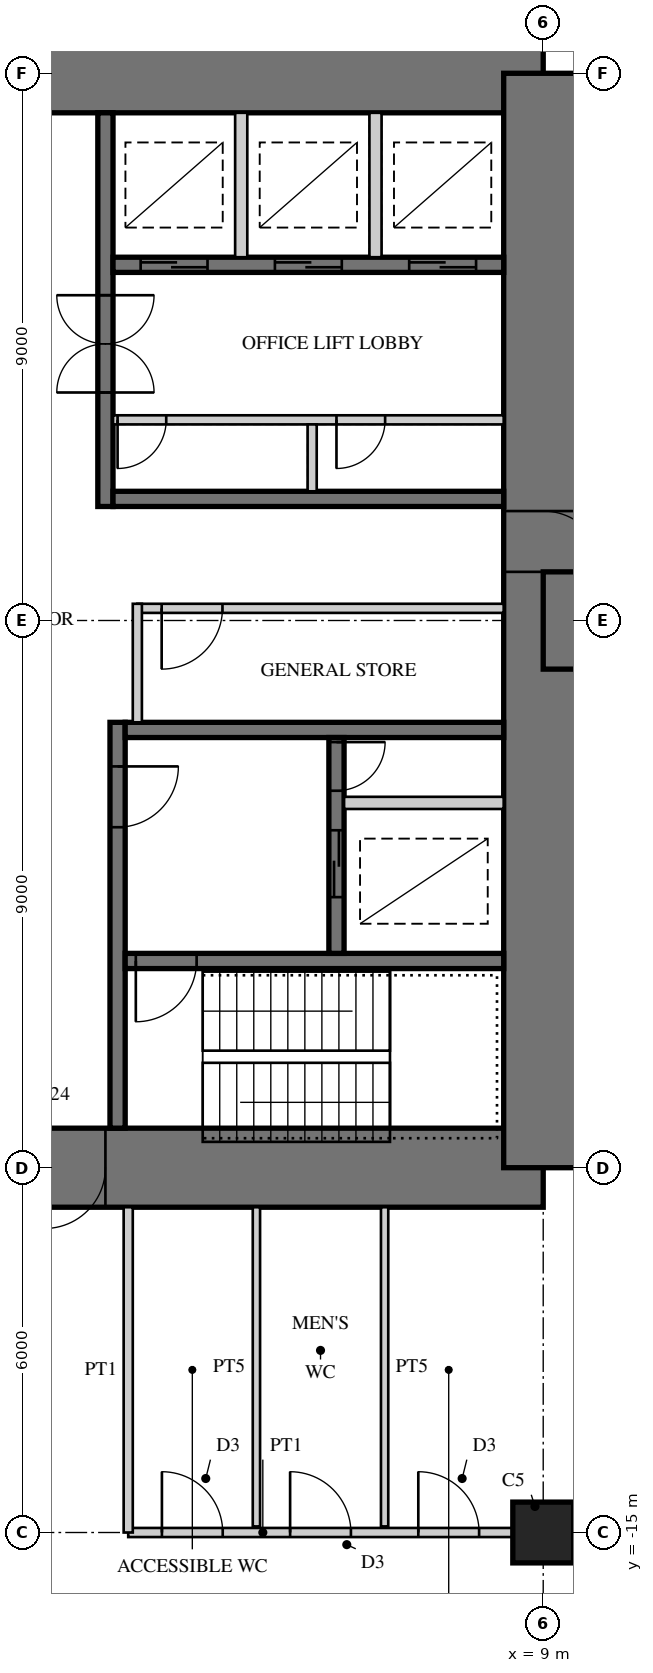
"""IFC4 building model, lengths in metres.
Left out: names, types, materials, properties, quantities, classifications, styles, units other than length and angle.
Written with IfcOpenShell. Run it as: python <this file> out.ifc"""

import sys

from ifc_helpers import new_model, si_unit, direction, frame, frame_2d, origin, origin_2d, place, context, subcontext, project, spatial, rectangle, extrude, element, fill, save


model = new_model("IFC4")
c1 = context("Model", 3, precision=1e-05, world=origin(), true_north=direction((0.0, 1.0)))
c2 = subcontext(c1, "Body", "Model", "MODEL_VIEW")
j1 = project(units=[si_unit("LENGTHUNIT", "METRE"), si_unit("PLANEANGLEUNIT", "RADIAN")], contexts=[c1])
p1 = place(None, origin())
s1 = spatial("IfcSite", under=j1, at=p1, CompositionType="ELEMENT")
p2 = place(p1, origin())
s2 = spatial("IfcBuilding", under=s1, at=p2, CompositionType="ELEMENT")
p3 = place(p2, frame((0.0, 0.0, 152.5)))
s3 = spatial("IfcBuildingStorey", under=s2, at=p3, CompositionType="ELEMENT", Elevation=152.5)
p4 = place(p3, frame((9.0, 9.0, 0.0), z_axis=(0.0, 0.0, 1.0), x_axis=(-1.0, 0.0, 0.0)))
e1 = element("IfcWall", 1, at=p4, inside=s3, PredefinedType="SHEAR", context=c2, shape_type="SweptSolid", body=[
    extrude(rectangle(XDim=18.0, YDim=1.3, at=frame_2d((9.0, 0.0))), origin(), (0.0, 0.0, 1.0), 4.0),
])
p5 = place(p4, frame((9.8, 0.0, 0.0)))
e2 = element("IfcOpeningElement", 2, at=p5, cuts=e1, PredefinedType="OPENING", context=c2, shape_type="SweptSolid", body=[
    extrude(rectangle(XDim=1.0, YDim=2.4, at=frame_2d((0.5, 1.2))), frame((0.0, 0.66, 0.0), z_axis=(0.0, -1.0, 0.0), x_axis=(1.0, 0.0, 0.0)), (0.0, 0.0, 1.0), 1.32),
])
p6 = place(p3, frame((-9.0, -9.0, 0.0), z_axis=(0.0, 0.0, 1.0), x_axis=(1.0, 0.0, 0.0)))
e3 = element("IfcWall", 3, at=p6, inside=s3, PredefinedType="SHEAR", context=c2, shape_type="SweptSolid", body=[
    extrude(rectangle(XDim=18.0, YDim=1.3, at=frame_2d((9.0, 0.0))), origin(), (0.0, 0.0, 1.0), 4.0),
])
p7 = place(p6, frame((9.8, 0.0, 0.0)))
e4 = element("IfcOpeningElement", 4, at=p7, cuts=e3, PredefinedType="OPENING", context=c2, shape_type="SweptSolid", body=[
    extrude(rectangle(XDim=1.0, YDim=2.4, at=frame_2d((0.5, 1.2))), frame((0.0, 0.66, 0.0), z_axis=(0.0, -1.0, 0.0), x_axis=(1.0, 0.0, 0.0)), (0.0, 0.0, 1.0), 1.32),
])
p8 = place(p3, frame((9.0, -9.0, 0.0), z_axis=(0.0, 0.0, 1.0), x_axis=(0.0, 1.0, 0.0)))
e5 = element("IfcWall", 5, at=p8, inside=s3, PredefinedType="SHEAR", context=c2, shape_type="SweptSolid", body=[
    extrude(rectangle(XDim=18.0, YDim=1.3, at=frame_2d((9.0, 0.0))), origin(), (0.0, 0.0, 1.0), 4.0),
])
p9 = place(p8, frame((9.8, 0.0, 0.0)))
e6 = element("IfcOpeningElement", 6, at=p9, cuts=e5, PredefinedType="OPENING", context=c2, shape_type="SweptSolid", body=[
    extrude(rectangle(XDim=1.0, YDim=2.4, at=frame_2d((0.5, 1.2))), frame((0.0, 0.66, 0.0), z_axis=(0.0, -1.0, 0.0), x_axis=(1.0, 0.0, 0.0)), (0.0, 0.0, 1.0), 1.32),
])
p10 = place(p3, frame((1.8, 1.875, 0.0), z_axis=(0.0, 0.0, 1.0), x_axis=(0.0, 1.0, 0.0)))
e7 = element("IfcWall", 7, at=p10, inside=s3, PredefinedType="SHEAR", context=c2, shape_type="SweptSolid", body=[
    extrude(rectangle(XDim=6.475, YDim=0.25, at=frame_2d((3.238, 0.0))), origin(), (0.0, 0.0, 1.0), 4.0),
])
p11 = place(p10, frame((1.875, 0.0, 0.0)))
e8 = element("IfcOpeningElement", 8, at=p11, cuts=e7, PredefinedType="OPENING", context=c2, shape_type="SweptSolid", body=[
    extrude(rectangle(XDim=1.6, YDim=2.4, at=frame_2d((0.8, 1.2))), frame((0.0, 0.135, 0.0), z_axis=(0.0, -1.0, 0.0), x_axis=(1.0, 0.0, 0.0)), (0.0, 0.0, 1.0), 0.27),
])
p12 = place(p3, frame((1.925, 2.0, 0.0), z_axis=(0.0, 0.0, 1.0), x_axis=(1.0, 0.0, 0.0)))
e9 = element("IfcWall", 9, at=p12, inside=s3, PredefinedType="SHEAR", context=c2, shape_type="SweptSolid", body=[
    extrude(rectangle(XDim=6.425, YDim=0.25, at=frame_2d((3.212, 0.0))), origin(), (0.0, 0.0, 1.0), 4.0),
])
p13 = place(p3, frame((1.925, 5.85, 0.0), z_axis=(0.0, 0.0, 1.0), x_axis=(1.0, 0.0, 0.0)))
e10 = element("IfcWall", 10, at=p13, inside=s3, PredefinedType="SHEAR", context=c2, shape_type="SweptSolid", body=[
    extrude(rectangle(XDim=6.425, YDim=0.25, at=frame_2d((3.212, 0.0))), origin(), (0.0, 0.0, 1.0), 4.0),
])
p14 = place(p13, frame((0.454, 0.0, 0.0)))
e11 = element("IfcOpeningElement", 11, at=p14, cuts=e10, PredefinedType="OPENING", context=c2, shape_type="SweptSolid", body=[
    extrude(rectangle(XDim=1.1, YDim=2.2, at=frame_2d((0.55, 1.1))), frame((0.0, 0.135, 0.0), z_axis=(0.0, -1.0, 0.0), x_axis=(1.0, 0.0, 0.0)), (0.0, 0.0, 1.0), 0.27),
])
p15 = place(p13, frame((2.663, 0.0, 0.0)))
e12 = element("IfcOpeningElement", 12, at=p15, cuts=e10, PredefinedType="OPENING", context=c2, shape_type="SweptSolid", body=[
    extrude(rectangle(XDim=1.1, YDim=2.2, at=frame_2d((0.55, 1.1))), frame((0.0, 0.135, 0.0), z_axis=(0.0, -1.0, 0.0), x_axis=(1.0, 0.0, 0.0)), (0.0, 0.0, 1.0), 0.27),
])
p16 = place(p13, frame((4.871, 0.0, 0.0)))
e13 = element("IfcOpeningElement", 13, at=p16, cuts=e10, PredefinedType="OPENING", context=c2, shape_type="SweptSolid", body=[
    extrude(rectangle(XDim=1.1, YDim=2.2, at=frame_2d((0.55, 1.1))), frame((0.0, 0.135, 0.0), z_axis=(0.0, -1.0, 0.0), x_axis=(1.0, 0.0, 0.0)), (0.0, 0.0, 1.0), 0.27),
])
p17 = place(p3, frame((1.925, 3.3, 0.0), z_axis=(0.0, 0.0, 1.0), x_axis=(1.0, 0.0, 0.0)))
e14 = element("IfcWall", 14, at=p17, inside=s3, PredefinedType="PARTITIONING", context=c2, shape_type="SweptSolid", body=[
    extrude(rectangle(XDim=6.425, YDim=0.15, at=frame_2d((3.212, 0.0))), origin(), (0.0, 0.0, 1.0), 4.0),
])
p18 = place(p17, frame((0.075, 0.0, 0.0)))
e15 = element("IfcOpeningElement", 15, at=p18, cuts=e14, PredefinedType="OPENING", context=c2, shape_type="SweptSolid", body=[
    extrude(rectangle(XDim=0.8, YDim=2.1, at=frame_2d((0.4, 1.05))), frame((0.0, 0.085, 0.0), z_axis=(0.0, -1.0, 0.0), x_axis=(1.0, 0.0, 0.0)), (0.0, 0.0, 1.0), 0.17),
])
p19 = place(p17, frame((3.675, 0.0, 0.0)))
e16 = element("IfcOpeningElement", 16, at=p19, cuts=e14, PredefinedType="OPENING", context=c2, shape_type="SweptSolid", body=[
    extrude(rectangle(XDim=0.8, YDim=2.1, at=frame_2d((0.4, 1.05))), frame((0.0, 0.085, 0.0), z_axis=(0.0, -1.0, 0.0), x_axis=(1.0, 0.0, 0.0)), (0.0, 0.0, 1.0), 0.17),
])
p20 = place(p3, frame((5.2, 2.125, 0.0), z_axis=(0.0, 0.0, 1.0), x_axis=(0.0, 1.0, 0.0)))
e17 = element("IfcWall", 17, at=p20, inside=s3, PredefinedType="PARTITIONING", context=c2, shape_type="SweptSolid", body=[
    extrude(rectangle(XDim=1.1, YDim=0.15, at=frame_2d((0.55, 0.0))), origin(), (0.0, 0.0, 1.0), 4.0),
])
for number, where, z_axis, x_axis in (
    (18, (4.033, 5.975, 0.0), (0.0, 0.0, 1.0), (0.0, 1.0, 0.0)),
    (19, (6.242, 5.975, 0.0), (0.0, 0.0, 1.0), (0.0, 1.0, 0.0)),
):
    element("IfcWall", number, at=place(p3, frame(where, z_axis=z_axis, x_axis=x_axis)), inside=s3, PredefinedType="PARTITIONING", context=c2, shape_type="SweptSolid", body=[
        extrude(rectangle(XDim=2.375, YDim=0.2, at=frame_2d((1.188, 0.0))), origin(), (0.0, 0.0, 1.0), 4.0),
    ])
p21 = place(p3, frame((2.0, -1.675, 0.0), z_axis=(0.0, 0.0, 1.0), x_axis=(0.0, -1.0, 0.0)))
e20 = element("IfcWall", 20, at=p21, inside=s3, PredefinedType="SHEAR", context=c2, shape_type="SweptSolid", body=[
    extrude(rectangle(XDim=6.675, YDim=0.25, at=frame_2d((3.337, 0.0))), origin(), (0.0, 0.0, 1.0), 4.0),
])
p22 = place(p21, frame((0.725, 0.0, 0.0)))
e21 = element("IfcOpeningElement", 21, at=p22, cuts=e20, PredefinedType="OPENING", context=c2, shape_type="SweptSolid", body=[
    extrude(rectangle(XDim=1.0, YDim=2.1, at=frame_2d((0.5, 1.05))), frame((0.0, 0.135, 0.0), z_axis=(0.0, -1.0, 0.0), x_axis=(1.0, 0.0, 0.0)), (0.0, 0.0, 1.0), 0.27),
])
p23 = place(p3, frame((2.125, -1.8, 0.0), z_axis=(0.0, 0.0, 1.0), x_axis=(1.0, 0.0, 0.0)))
e22 = element("IfcWall", 22, at=p23, inside=s3, PredefinedType="SHEAR", context=c2, shape_type="SweptSolid", body=[
    extrude(rectangle(XDim=6.225, YDim=0.25, at=frame_2d((3.113, 0.0))), origin(), (0.0, 0.0, 1.0), 4.0),
])
p24 = place(p3, frame((2.125, -5.6, 0.0), z_axis=(0.0, 0.0, 1.0), x_axis=(1.0, 0.0, 0.0)))
e23 = element("IfcWall", 23, at=p24, inside=s3, PredefinedType="SHEAR", context=c2, shape_type="SweptSolid", body=[
    extrude(rectangle(XDim=6.225, YDim=0.25, at=frame_2d((3.113, 0.0))), origin(), (0.0, 0.0, 1.0), 4.0),
])
p25 = place(p24, frame((0.175, 0.0, 0.0)))
e24 = element("IfcOpeningElement", 24, at=p25, cuts=e23, PredefinedType="OPENING", context=c2, shape_type="SweptSolid", body=[
    extrude(rectangle(XDim=1.0, YDim=2.1, at=frame_2d((0.5, 1.05))), frame((0.0, 0.135, 0.0), z_axis=(0.0, -1.0, 0.0), x_axis=(1.0, 0.0, 0.0)), (0.0, 0.0, 1.0), 0.27),
])
p26 = place(p3, frame((5.6, -1.925, 0.0), z_axis=(0.0, 0.0, 1.0), x_axis=(0.0, -1.0, 0.0)))
e25 = element("IfcWall", 25, at=p26, inside=s3, PredefinedType="SHEAR", context=c2, shape_type="SweptSolid", body=[
    extrude(rectangle(XDim=3.55, YDim=0.25, at=frame_2d((1.775, 0.0))), origin(), (0.0, 0.0, 1.0), 4.0),
])
p27 = place(p26, frame((1.525, 0.0, 0.0)))
e26 = element("IfcOpeningElement", 26, at=p27, cuts=e25, PredefinedType="OPENING", context=c2, shape_type="SweptSolid", body=[
    extrude(rectangle(XDim=1.1, YDim=2.2, at=frame_2d((0.55, 1.1))), frame((0.0, 0.135, 0.0), z_axis=(0.0, -1.0, 0.0), x_axis=(1.0, 0.0, 0.0)), (0.0, 0.0, 1.0), 0.27),
])
p28 = place(p26, frame((0.075, 0.0, 0.0)))
e27 = element("IfcOpeningElement", 27, at=p28, cuts=e25, PredefinedType="OPENING", context=c2, shape_type="SweptSolid", body=[
    extrude(rectangle(XDim=0.8, YDim=2.1, at=frame_2d((0.4, 1.05))), frame((0.0, 0.135, 0.0), z_axis=(0.0, -1.0, 0.0), x_axis=(1.0, 0.0, 0.0)), (0.0, 0.0, 1.0), 0.27),
])
p29 = place(p3, frame((5.725, -3.0, 0.0), z_axis=(0.0, 0.0, 1.0), x_axis=(1.0, 0.0, 0.0)))
e28 = element("IfcWall", 28, at=p29, inside=s3, PredefinedType="PARTITIONING", context=c2, shape_type="SweptSolid", body=[
    extrude(rectangle(XDim=2.625, YDim=0.2, at=frame_2d((1.312, 0.0))), origin(), (0.0, 0.0, 1.0), 4.0),
])
p30 = place(p3, frame((9.0, 0.0, 0.0), z_axis=(0.0, 0.0, 1.0), x_axis=(1.0, 0.0, 0.0)))
e29 = element("IfcWall", 29, at=p30, inside=s3, PredefinedType="SHEAR", context=c2, shape_type="SweptSolid", body=[
    extrude(rectangle(XDim=4.05, YDim=1.6, at=frame_2d((2.025, 0.0))), origin(), (0.0, 0.0, 1.0), 4.0),
])
p31 = place(p3, frame((9.0, -15.0, 0.0), z_axis=(0.0, 0.0, 1.0), x_axis=(1.0, 0.0, 0.0)))
e30 = element("IfcColumn", 30, at=p31, inside=s3, PredefinedType="COLUMN", context=c2, shape_type="SweptSolid", body=[
    extrude(rectangle(XDim=1.0, YDim=1.0, at=origin_2d()), origin(), (0.0, 0.0, 1.0), 4.0),
])
p32 = place(p3, frame((2.325, 0.2, 0.0), z_axis=(0.0, 0.0, 1.0), x_axis=(1.0, 0.0, 0.0)))
e31 = element("IfcWall", 31, at=p32, inside=s3, PredefinedType="PARTITIONING", context=c2, shape_type="SweptSolid", body=[
    extrude(rectangle(XDim=6.025, YDim=0.15, at=frame_2d((3.013, 0.0))), origin(), (0.0, 0.0, 1.0), 3.8),
])
p33 = place(p32, frame((0.4, 0.0, 0.0)))
e32 = element("IfcOpeningElement", 32, at=p33, cuts=e31, PredefinedType="OPENING", context=c2, shape_type="SweptSolid", body=[
    extrude(rectangle(XDim=1.0, YDim=2.1, at=frame_2d((0.5, 1.05))), frame((0.0, 0.085, 0.0), z_axis=(0.0, -1.0, 0.0), x_axis=(1.0, 0.0, 0.0)), (0.0, 0.0, 1.0), 0.17),
])
p34 = place(p3, frame((2.325, -1.675, 0.0), z_axis=(0.0, 0.0, 1.0), x_axis=(0.0, 1.0, 0.0)))
e33 = element("IfcWall", 33, at=p34, inside=s3, PredefinedType="PARTITIONING", context=c2, shape_type="SweptSolid", body=[
    extrude(rectangle(XDim=1.95, YDim=0.15, at=frame_2d((0.975, 0.0))), origin(), (0.0, 0.0, 1.0), 3.8),
])
p35 = place(p3, frame((2.175, -15.0, 0.0), z_axis=(0.0, 0.0, 1.0), x_axis=(1.0, 0.0, 0.0)))
e34 = element("IfcWall", 34, at=p35, inside=s3, PredefinedType="PARTITIONING", context=c2, shape_type="SweptSolid", body=[
    extrude(rectangle(XDim=6.325, YDim=0.15, at=frame_2d((3.163, 0.0))), origin(), (0.0, 0.0, 1.0), 3.0),
])
p36 = place(p35, frame((0.554, 0.0, 0.0)))
e35 = element("IfcOpeningElement", 35, at=p36, cuts=e34, PredefinedType="OPENING", context=c2, shape_type="SweptSolid", body=[
    extrude(rectangle(XDim=1.0, YDim=2.1, at=frame_2d((0.5, 1.05))), frame((0.0, 0.085, 0.0), z_axis=(0.0, -1.0, 0.0), x_axis=(1.0, 0.0, 0.0)), (0.0, 0.0, 1.0), 0.17),
])
p37 = place(p35, frame((2.663, 0.0, 0.0)))
e36 = element("IfcOpeningElement", 36, at=p37, cuts=e34, PredefinedType="OPENING", context=c2, shape_type="SweptSolid", body=[
    extrude(rectangle(XDim=1.0, YDim=2.1, at=frame_2d((0.5, 1.05))), frame((0.0, 0.085, 0.0), z_axis=(0.0, -1.0, 0.0), x_axis=(1.0, 0.0, 0.0)), (0.0, 0.0, 1.0), 0.17),
])
p38 = place(p35, frame((4.771, 0.0, 0.0)))
e37 = element("IfcOpeningElement", 37, at=p38, cuts=e34, PredefinedType="OPENING", context=c2, shape_type="SweptSolid", body=[
    extrude(rectangle(XDim=1.0, YDim=2.1, at=frame_2d((0.5, 1.05))), frame((0.0, 0.085, 0.0), z_axis=(0.0, -1.0, 0.0), x_axis=(1.0, 0.0, 0.0)), (0.0, 0.0, 1.0), 0.17),
])
p39 = place(p3, frame((2.175, -9.65, 0.0), z_axis=(0.0, 0.0, 1.0), x_axis=(0.0, -1.0, 0.0)))
e38 = element("IfcWall", 38, at=p39, inside=s3, PredefinedType="PARTITIONING", context=c2, shape_type="SweptSolid", body=[
    extrude(rectangle(XDim=5.35, YDim=0.15, at=frame_2d((2.675, 0.0))), origin(), (0.0, 0.0, 1.0), 3.8),
])
for number, where, z_axis, x_axis in (
    (39, (4.283, -9.65, 0.0), (0.0, 0.0, 1.0), (0.0, -1.0, 0.0)),
    (40, (6.392, -9.65, 0.0), (0.0, 0.0, 1.0), (0.0, -1.0, 0.0)),
):
    element("IfcWall", number, at=place(p3, frame(where, z_axis=z_axis, x_axis=x_axis)), inside=s3, PredefinedType="PLUMBINGWALL", context=c2, shape_type="SweptSolid", body=[
        extrude(rectangle(XDim=5.25, YDim=0.12, at=frame_2d((2.625, 0.0))), origin(), (0.0, 0.0, 1.0), 3.8),
    ])
p40 = place(p33, frame((1.0, 0.0, 0.0), z_axis=(0.0, 0.0, 1.0), x_axis=(-1.0, 0.0, 0.0)))
e41 = element("IfcDoor", 41, at=p40, inside=s3, OperationType="SINGLE_SWING_RIGHT", PredefinedType="DOOR", context=c2, shape_type="SweptSolid", body=[
    extrude(rectangle(XDim=1.0, YDim=2.1, at=frame_2d((0.5, 1.05))), frame((0.0, 0.025, 0.0), z_axis=(0.0, -1.0, 0.0), x_axis=(1.0, 0.0, 0.0)), (0.0, 0.0, 1.0), 0.05),
])
fill(e32, e41)
p41 = place(p36, origin())
e42 = element("IfcDoor", 42, at=p41, inside=s3, OperationType="SINGLE_SWING_LEFT", PredefinedType="DOOR", context=c2, shape_type="SweptSolid", body=[
    extrude(rectangle(XDim=1.0, YDim=2.1, at=frame_2d((0.5, 1.05))), frame((0.0, 0.025, 0.0), z_axis=(0.0, -1.0, 0.0), x_axis=(1.0, 0.0, 0.0)), (0.0, 0.0, 1.0), 0.05),
])
fill(e35, e42)
p42 = place(p37, origin())
e43 = element("IfcDoor", 43, at=p42, inside=s3, OperationType="SINGLE_SWING_LEFT", PredefinedType="DOOR", context=c2, shape_type="SweptSolid", body=[
    extrude(rectangle(XDim=1.0, YDim=2.1, at=frame_2d((0.5, 1.05))), frame((0.0, 0.025, 0.0), z_axis=(0.0, -1.0, 0.0), x_axis=(1.0, 0.0, 0.0)), (0.0, 0.0, 1.0), 0.05),
])
fill(e36, e43)
p43 = place(p38, origin())
e44 = element("IfcDoor", 44, at=p43, inside=s3, OperationType="SINGLE_SWING_LEFT", PredefinedType="DOOR", context=c2, shape_type="SweptSolid", body=[
    extrude(rectangle(XDim=1.0, YDim=2.1, at=frame_2d((0.5, 1.05))), frame((0.0, 0.025, 0.0), z_axis=(0.0, -1.0, 0.0), x_axis=(1.0, 0.0, 0.0)), (0.0, 0.0, 1.0), 0.05),
])
fill(e37, e44)
p44 = place(p7, frame((1.0, 0.0, 0.0), z_axis=(0.0, 0.0, 1.0), x_axis=(-1.0, 0.0, 0.0)))
e45 = element("IfcDoor", 45, at=p44, inside=s3, OperationType="SINGLE_SWING_RIGHT", PredefinedType="DOOR", context=c2, shape_type="SweptSolid", body=[
    extrude(rectangle(XDim=1.0, YDim=2.4, at=frame_2d((0.5, 1.2))), frame((0.0, -0.005, 0.0), z_axis=(0.0, -1.0, 0.0), x_axis=(1.0, 0.0, 0.0)), (0.0, 0.0, 1.0), 0.05),
])
fill(e4, e45)
p45 = place(p9, frame((1.0, 0.0, 0.0), z_axis=(0.0, 0.0, 1.0), x_axis=(-1.0, 0.0, 0.0)))
e46 = element("IfcDoor", 46, at=p45, inside=s3, OperationType="SINGLE_SWING_RIGHT", PredefinedType="DOOR", context=c2, shape_type="SweptSolid", body=[
    extrude(rectangle(XDim=1.0, YDim=2.4, at=frame_2d((0.5, 1.2))), frame((0.0, -0.005, 0.0), z_axis=(0.0, -1.0, 0.0), x_axis=(1.0, 0.0, 0.0)), (0.0, 0.0, 1.0), 0.05),
])
fill(e6, e46)
p46 = place(p14, origin())
e47 = element("IfcDoor", 47, at=p46, inside=s3, OperationType="DOUBLE_DOOR_SLIDING", PredefinedType="DOOR", context=c2, shape_type="SweptSolid", body=[
    extrude(rectangle(XDim=1.1, YDim=2.2, at=frame_2d((0.55, 1.1))), frame((0.0, 0.025, 0.0), z_axis=(0.0, -1.0, 0.0), x_axis=(1.0, 0.0, 0.0)), (0.0, 0.0, 1.0), 0.05),
])
fill(e11, e47)
p47 = place(p15, origin())
e48 = element("IfcDoor", 48, at=p47, inside=s3, OperationType="DOUBLE_DOOR_SLIDING", PredefinedType="DOOR", context=c2, shape_type="SweptSolid", body=[
    extrude(rectangle(XDim=1.1, YDim=2.2, at=frame_2d((0.55, 1.1))), frame((0.0, 0.025, 0.0), z_axis=(0.0, -1.0, 0.0), x_axis=(1.0, 0.0, 0.0)), (0.0, 0.0, 1.0), 0.05),
])
fill(e12, e48)
p48 = place(p16, origin())
e49 = element("IfcDoor", 49, at=p48, inside=s3, OperationType="DOUBLE_DOOR_SLIDING", PredefinedType="DOOR", context=c2, shape_type="SweptSolid", body=[
    extrude(rectangle(XDim=1.1, YDim=2.2, at=frame_2d((0.55, 1.1))), frame((0.0, 0.025, 0.0), z_axis=(0.0, -1.0, 0.0), x_axis=(1.0, 0.0, 0.0)), (0.0, 0.0, 1.0), 0.05),
])
fill(e13, e49)
p49 = place(p11, origin())
e50 = element("IfcDoor", 50, at=p49, inside=s3, OperationType="DOUBLE_DOOR_DOUBLE_SWING", PredefinedType="DOOR", context=c2, shape_type="SweptSolid", body=[
    extrude(rectangle(XDim=1.6, YDim=2.4, at=frame_2d((0.8, 1.2))), frame((0.0, 0.025, 0.0), z_axis=(0.0, -1.0, 0.0), x_axis=(1.0, 0.0, 0.0)), (0.0, 0.0, 1.0), 0.05),
])
fill(e8, e50)
p50 = place(p18, frame((0.8, 0.0, 0.0), z_axis=(0.0, 0.0, 1.0), x_axis=(-1.0, 0.0, 0.0)))
e51 = element("IfcDoor", 51, at=p50, inside=s3, OperationType="SINGLE_SWING_RIGHT", PredefinedType="DOOR", context=c2, shape_type="SweptSolid", body=[
    extrude(rectangle(XDim=0.8, YDim=2.1, at=frame_2d((0.4, 1.05))), frame((0.0, 0.025, 0.0), z_axis=(0.0, -1.0, 0.0), x_axis=(1.0, 0.0, 0.0)), (0.0, 0.0, 1.0), 0.05),
])
fill(e15, e51)
p51 = place(p19, frame((0.8, 0.0, 0.0), z_axis=(0.0, 0.0, 1.0), x_axis=(-1.0, 0.0, 0.0)))
e52 = element("IfcDoor", 52, at=p51, inside=s3, OperationType="SINGLE_SWING_RIGHT", PredefinedType="DOOR", context=c2, shape_type="SweptSolid", body=[
    extrude(rectangle(XDim=0.8, YDim=2.1, at=frame_2d((0.4, 1.05))), frame((0.0, 0.025, 0.0), z_axis=(0.0, -1.0, 0.0), x_axis=(1.0, 0.0, 0.0)), (0.0, 0.0, 1.0), 0.05),
])
fill(e16, e52)
p52 = place(p22, origin())
e53 = element("IfcDoor", 53, at=p52, inside=s3, OperationType="SINGLE_SWING_LEFT", PredefinedType="DOOR", context=c2, shape_type="SweptSolid", body=[
    extrude(rectangle(XDim=1.0, YDim=2.1, at=frame_2d((0.5, 1.05))), frame((0.0, 0.025, 0.0), z_axis=(0.0, -1.0, 0.0), x_axis=(1.0, 0.0, 0.0)), (0.0, 0.0, 1.0), 0.05),
])
fill(e21, e53)
p53 = place(p25, frame((1.0, 0.0, 0.0), z_axis=(0.0, 0.0, 1.0), x_axis=(-1.0, 0.0, 0.0)))
e54 = element("IfcDoor", 54, at=p53, inside=s3, OperationType="SINGLE_SWING_RIGHT", PredefinedType="DOOR", context=c2, shape_type="SweptSolid", body=[
    extrude(rectangle(XDim=1.0, YDim=2.1, at=frame_2d((0.5, 1.05))), frame((0.0, 0.025, 0.0), z_axis=(0.0, -1.0, 0.0), x_axis=(1.0, 0.0, 0.0)), (0.0, 0.0, 1.0), 0.05),
])
fill(e24, e54)
p54 = place(p27, origin())
e55 = element("IfcDoor", 55, at=p54, inside=s3, OperationType="DOUBLE_DOOR_SLIDING", PredefinedType="DOOR", context=c2, shape_type="SweptSolid", body=[
    extrude(rectangle(XDim=1.1, YDim=2.2, at=frame_2d((0.55, 1.1))), frame((0.0, 0.025, 0.0), z_axis=(0.0, -1.0, 0.0), x_axis=(1.0, 0.0, 0.0)), (0.0, 0.0, 1.0), 0.05),
])
fill(e26, e55)
p55 = place(p28, origin())
e56 = element("IfcDoor", 56, at=p55, inside=s3, OperationType="SINGLE_SWING_LEFT", PredefinedType="DOOR", context=c2, shape_type="SweptSolid", body=[
    extrude(rectangle(XDim=0.8, YDim=2.1, at=frame_2d((0.4, 1.05))), frame((0.0, 0.025, 0.0), z_axis=(0.0, -1.0, 0.0), x_axis=(1.0, 0.0, 0.0)), (0.0, 0.0, 1.0), 0.05),
])
fill(e27, e56)
save(model, sys.argv[1])
